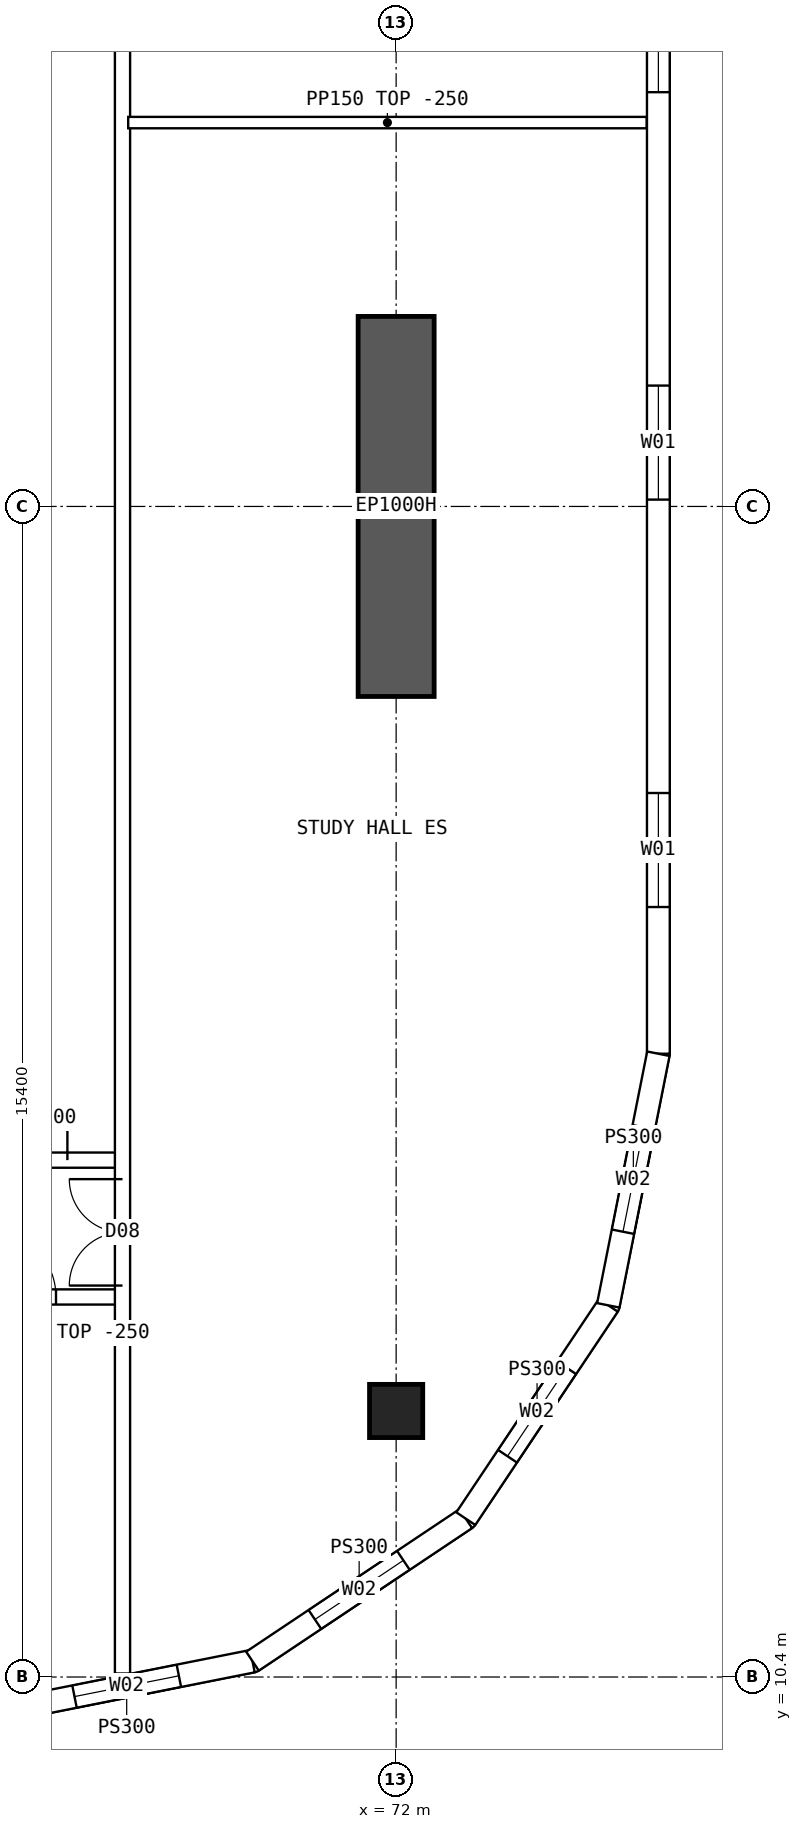
"""IFC4 building model, lengths in metres.
Left out: names, types, materials, properties, quantities, classifications, styles, units other than length and angle.
Written with IfcOpenShell. Run it as: python <this file> out.ifc"""

import sys

from ifc_helpers import new_model, si_unit, direction, frame, frame_2d, origin, origin_2d, place, context, subcontext, project, spatial, polyline, rectangle, hollow_rectangle, outline, extrude, element, fill, save


model = new_model("IFC4")
c1 = context("Model", 3, precision=1e-05, world=origin(), true_north=direction((0.0, 1.0)))
c2 = subcontext(c1, "Body", "Model", "MODEL_VIEW")
j1 = project(units=[si_unit("LENGTHUNIT", "METRE"), si_unit("PLANEANGLEUNIT", "RADIAN")], contexts=[c1])
p1 = place(None, origin())
s1 = spatial("IfcSite", under=j1, at=p1, CompositionType="ELEMENT")
p2 = place(p1, origin())
s2 = spatial("IfcBuilding", under=s1, at=p2, CompositionType="ELEMENT")
p3 = place(p2, frame((0.0, 0.0, 178.6)))
s3 = spatial("IfcBuildingStorey", under=s2, at=p3, CompositionType="ELEMENT", Elevation=178.6)
p4 = place(p3, frame((72.0, 13.9, 0.0), z_axis=(0.0, 0.0, 1.0), x_axis=(1.0, 0.0, 0.0)))
e1 = element("IfcColumn", 1, at=p4, inside=s3, PredefinedType="COLUMN", context=c2, shape_type="SweptSolid", body=[
    extrude(hollow_rectangle(XDim=0.7, YDim=0.7, WallThickness=0.07, at=origin_2d()), origin(), (0.0, 0.0, 1.0), 3.75),
])
p5 = place(p3, frame((72.0, 23.3, 0.0), z_axis=(0.0, 0.0, 1.0), x_axis=(0.0, 1.0, 0.0)))
e2 = element("IfcWall", 2, at=p5, inside=s3, PredefinedType="SHEAR", context=c2, shape_type="SweptSolid", body=[
    extrude(rectangle(XDim=5.0, YDim=1.0, at=frame_2d((2.5, 0.0))), origin(), (0.0, 0.0, 1.0), 3.75),
])
p6 = place(p3, frame((75.45, 18.6, 0.0), z_axis=(0.0, 0.0, 1.0), x_axis=(0.0, 1.0, 0.0)))
e3 = element("IfcWall", 3, at=p6, inside=s3, PredefinedType="SOLIDWALL", context=c2, shape_type="SweptSolid", body=[
    extrude(outline(polyline([(-0.015, -0.15), (26.815, -0.15), (26.785, 0.15), (0.015, 0.15), (-0.015, -0.15)])), origin(), (0.0, 0.0, 1.0), 3.5),
])
p7 = place(p6, frame((1.93, 0.0, 0.9)))
e4 = element("IfcOpeningElement", 4, at=p7, cuts=e3, PredefinedType="OPENING", context=c2, shape_type="SweptSolid", body=[
    extrude(rectangle(XDim=1.5, YDim=2.0, at=frame_2d((0.75, 1.0))), frame((0.0, 0.16, 0.0), z_axis=(0.0, -1.0, 0.0), x_axis=(1.0, 0.0, 0.0)), (0.0, 0.0, 1.0), 0.32),
])
p8 = place(p6, frame((7.29, 0.0, 0.9)))
e5 = element("IfcOpeningElement", 5, at=p8, cuts=e3, PredefinedType="OPENING", context=c2, shape_type="SweptSolid", body=[
    extrude(rectangle(XDim=1.5, YDim=2.0, at=frame_2d((0.75, 1.0))), frame((0.0, 0.16, 0.0), z_axis=(0.0, -1.0, 0.0), x_axis=(1.0, 0.0, 0.0)), (0.0, 0.0, 1.0), 0.32),
])
p9 = place(p6, frame((12.65, 0.0, 0.9)))
e6 = element("IfcOpeningElement", 6, at=p9, cuts=e3, PredefinedType="OPENING", context=c2, shape_type="SweptSolid", body=[
    extrude(rectangle(XDim=1.5, YDim=2.0, at=frame_2d((0.75, 1.0))), frame((0.0, 0.16, 0.0), z_axis=(0.0, -1.0, 0.0), x_axis=(1.0, 0.0, 0.0)), (0.0, 0.0, 1.0), 0.32),
])
p10 = place(p6, frame((18.01, 0.0, 0.9)))
e7 = element("IfcOpeningElement", 7, at=p10, cuts=e3, PredefinedType="OPENING", context=c2, shape_type="SweptSolid", body=[
    extrude(rectangle(XDim=1.5, YDim=2.0, at=frame_2d((0.75, 1.0))), frame((0.0, 0.16, 0.0), z_axis=(0.0, -1.0, 0.0), x_axis=(1.0, 0.0, 0.0)), (0.0, 0.0, 1.0), 0.32),
])
p11 = place(p6, frame((23.37, 0.0, 0.9)))
e8 = element("IfcOpeningElement", 8, at=p11, cuts=e3, PredefinedType="OPENING", context=c2, shape_type="SweptSolid", body=[
    extrude(rectangle(XDim=1.5, YDim=2.0, at=frame_2d((0.75, 1.0))), frame((0.0, 0.16, 0.0), z_axis=(0.0, -1.0, 0.0), x_axis=(1.0, 0.0, 0.0)), (0.0, 0.0, 1.0), 0.32),
])
p12 = place(p3, frame((66.8, 9.95, 0.0), z_axis=(0.0, 0.0, 1.0), x_axis=(0.98078325777, 0.195100490205, 0.0)))
e9 = element("IfcWall", 9, at=p12, inside=s3, PredefinedType="SOLIDWALL", context=c2, shape_type="SweptSolid", body=[
    extrude(outline(polyline([(-0.03, -0.15), (3.405, -0.15), (3.345, 0.15), (0.03, 0.15), (-0.03, -0.15)])), origin(), (0.0, 0.0, 1.0), 3.5),
])
p13 = place(p12, frame((0.988, 0.0, 0.9)))
e10 = element("IfcOpeningElement", 10, at=p13, cuts=e9, PredefinedType="OPENING", context=c2, shape_type="SweptSolid", body=[
    extrude(rectangle(XDim=1.4, YDim=1.8, at=frame_2d((0.7, 0.9))), frame((0.0, 0.16, 0.0), z_axis=(0.0, -1.0, 0.0), x_axis=(1.0, 0.0, 0.0)), (0.0, 0.0, 1.0), 0.32),
])
p14 = place(p3, frame((70.11, 10.608, 0.0), z_axis=(0.0, 0.0, 1.0), x_axis=(0.831493450887, 0.555534554399, 0.0)))
e11 = element("IfcWall", 11, at=p14, inside=s3, PredefinedType="SOLIDWALL", context=c2, shape_type="SweptSolid", body=[
    extrude(outline(polyline([(-0.03, -0.15), (3.405, -0.15), (3.345, 0.15), (0.03, 0.15), (-0.03, -0.15)])), origin(), (0.0, 0.0, 1.0), 3.5),
])
p15 = place(p14, frame((0.988, 0.0, 0.9)))
e12 = element("IfcOpeningElement", 12, at=p15, cuts=e11, PredefinedType="OPENING", context=c2, shape_type="SweptSolid", body=[
    extrude(rectangle(XDim=1.4, YDim=1.8, at=frame_2d((0.7, 0.9))), frame((0.0, 0.16, 0.0), z_axis=(0.0, -1.0, 0.0), x_axis=(1.0, 0.0, 0.0)), (0.0, 0.0, 1.0), 0.32),
])
p16 = place(p3, frame((72.917, 12.483, 0.0), z_axis=(0.0, 0.0, 1.0), x_axis=(0.555534554399, 0.831493450887, 0.0)))
e13 = element("IfcWall", 13, at=p16, inside=s3, PredefinedType="SOLIDWALL", context=c2, shape_type="SweptSolid", body=[
    extrude(outline(polyline([(-0.03, -0.15), (3.405, -0.15), (3.345, 0.15), (0.03, 0.15), (-0.03, -0.15)])), origin(), (0.0, 0.0, 1.0), 3.5),
])
p17 = place(p16, frame((0.988, 0.0, 0.9)))
e14 = element("IfcOpeningElement", 14, at=p17, cuts=e13, PredefinedType="OPENING", context=c2, shape_type="SweptSolid", body=[
    extrude(rectangle(XDim=1.4, YDim=1.8, at=frame_2d((0.7, 0.9))), frame((0.0, 0.16, 0.0), z_axis=(0.0, -1.0, 0.0), x_axis=(1.0, 0.0, 0.0)), (0.0, 0.0, 1.0), 0.32),
])
p18 = place(p3, frame((74.792, 15.29, 0.0), z_axis=(0.0, 0.0, 1.0), x_axis=(0.19508664885, 0.980786011034, 0.0)))
e15 = element("IfcWall", 15, at=p18, inside=s3, PredefinedType="SOLIDWALL", context=c2, shape_type="SweptSolid", body=[
    extrude(outline(polyline([(-0.03, -0.15), (3.39, -0.15), (3.36, 0.15), (0.03, 0.15), (-0.03, -0.15)])), origin(), (0.0, 0.0, 1.0), 3.5),
])
p19 = place(p18, frame((0.988, 0.0, 0.9)))
e16 = element("IfcOpeningElement", 16, at=p19, cuts=e15, PredefinedType="OPENING", context=c2, shape_type="SweptSolid", body=[
    extrude(rectangle(XDim=1.4, YDim=1.8, at=frame_2d((0.7, 0.9))), frame((0.0, 0.16, 0.0), z_axis=(0.0, -1.0, 0.0), x_axis=(1.0, 0.0, 0.0)), (0.0, 0.0, 1.0), 0.32),
])
p20 = place(p3, frame((66.425, 15.4, 0.0), z_axis=(0.0, 0.0, 1.0), x_axis=(1.0, 0.0, 0.0)))
e17 = element("IfcWall", 17, at=p20, inside=s3, PredefinedType="SOLIDWALL", context=c2, shape_type="SweptSolid", body=[
    extrude(rectangle(XDim=1.975, YDim=0.2, at=frame_2d((0.987, 0.0))), origin(), (0.0, 0.0, 1.0), 3.5),
])
p21 = place(p20, frame((0.2, 0.0, 0.0)))
e18 = element("IfcOpeningElement", 18, at=p21, cuts=e17, PredefinedType="OPENING", context=c2, shape_type="SweptSolid", body=[
    extrude(rectangle(XDim=0.9, YDim=2.1, at=frame_2d((0.45, 1.05))), frame((0.0, 0.11, 0.0), z_axis=(0.0, -1.0, 0.0), x_axis=(1.0, 0.0, 0.0)), (0.0, 0.0, 1.0), 0.22),
])
p22 = place(p3, frame((66.425, 17.2, 0.0), z_axis=(0.0, 0.0, 1.0), x_axis=(1.0, 0.0, 0.0)))
e19 = element("IfcWall", 19, at=p22, inside=s3, PredefinedType="SOLIDWALL", context=c2, shape_type="SweptSolid", body=[
    extrude(rectangle(XDim=1.975, YDim=0.2, at=frame_2d((0.987, 0.0))), origin(), (0.0, 0.0, 1.0), 3.5),
])
p23 = place(p22, frame((0.05, 0.0, 0.0)))
e20 = element("IfcOpeningElement", 20, at=p23, cuts=e19, PredefinedType="OPENING", context=c2, shape_type="SweptSolid", body=[
    extrude(rectangle(XDim=1.2, YDim=2.1, at=frame_2d((0.6, 1.05))), frame((0.0, 0.11, 0.0), z_axis=(0.0, -1.0, 0.0), x_axis=(1.0, 0.0, 0.0)), (0.0, 0.0, 1.0), 0.22),
])
p24 = place(p3, frame((68.475, 30.85, 0.0), z_axis=(0.0, 0.0, 1.0), x_axis=(1.0, 0.0, 0.0)))
e21 = element("IfcWall", 21, at=p24, inside=s3, PredefinedType="PARTITIONING", context=c2, shape_type="SweptSolid", body=[
    extrude(outline(polyline([(0.0, 0.0), (6.82, 0.0), (6.82, 3.5), (3.827, 3.5), (3.825, 3.05), (3.227, 3.05), (3.225, 3.5), (0.0, 3.5), (0.0, 0.0)])), frame((0.0, 0.075, 0.0), z_axis=(0.0, -1.0, 0.0), x_axis=(1.0, 0.0, 0.0)), (0.0, 0.0, 1.0), 0.15),
])
p25 = place(p3, frame((68.4, 10.446, 0.0), z_axis=(0.0, 0.0, 1.0), x_axis=(0.0, 1.0, 0.0)))
e22 = element("IfcWall", 22, at=p25, inside=s3, PredefinedType="SOLIDWALL", context=c2, shape_type="SweptSolid", body=[
    extrude(rectangle(XDim=43.107, YDim=0.2, at=frame_2d((21.554, 0.0))), origin(), (0.0, 0.0, 1.0), 3.5),
])
p26 = place(p25, frame((5.104, 0.0, 0.0)))
e23 = element("IfcOpeningElement", 23, at=p26, cuts=e22, PredefinedType="OPENING", context=c2, shape_type="SweptSolid", body=[
    extrude(rectangle(XDim=1.4, YDim=2.1, at=frame_2d((0.7, 1.05))), frame((0.0, 0.11, 0.0), z_axis=(0.0, -1.0, 0.0), x_axis=(1.0, 0.0, 0.0)), (0.0, 0.0, 1.0), 0.22),
])
p27 = place(p25, frame((36.504, 0.0, 0.0)))
e24 = element("IfcOpeningElement", 24, at=p27, cuts=e22, PredefinedType="OPENING", context=c2, shape_type="SweptSolid", body=[
    extrude(rectangle(XDim=1.4, YDim=2.1, at=frame_2d((0.7, 1.05))), frame((0.0, 0.11, 0.0), z_axis=(0.0, -1.0, 0.0), x_axis=(1.0, 0.0, 0.0)), (0.0, 0.0, 1.0), 0.22),
])
p28 = place(p7, origin())
e25 = element("IfcWindow", 25, at=p28, inside=s3, PartitioningType="SINGLE_PANEL", PredefinedType="WINDOW", context=c2, shape_type="SweptSolid", body=[
    extrude(rectangle(XDim=1.5, YDim=2.0, at=frame_2d((0.75, 1.0))), frame((0.0, 0.03, 0.0), z_axis=(0.0, -1.0, 0.0), x_axis=(1.0, 0.0, 0.0)), (0.0, 0.0, 1.0), 0.06),
])
fill(e4, e25)
p29 = place(p8, origin())
e26 = element("IfcWindow", 26, at=p29, inside=s3, PartitioningType="SINGLE_PANEL", PredefinedType="WINDOW", context=c2, shape_type="SweptSolid", body=[
    extrude(rectangle(XDim=1.5, YDim=2.0, at=frame_2d((0.75, 1.0))), frame((0.0, 0.03, 0.0), z_axis=(0.0, -1.0, 0.0), x_axis=(1.0, 0.0, 0.0)), (0.0, 0.0, 1.0), 0.06),
])
fill(e5, e26)
p30 = place(p9, origin())
e27 = element("IfcWindow", 27, at=p30, inside=s3, PartitioningType="SINGLE_PANEL", PredefinedType="WINDOW", context=c2, shape_type="SweptSolid", body=[
    extrude(rectangle(XDim=1.5, YDim=2.0, at=frame_2d((0.75, 1.0))), frame((0.0, 0.03, 0.0), z_axis=(0.0, -1.0, 0.0), x_axis=(1.0, 0.0, 0.0)), (0.0, 0.0, 1.0), 0.06),
])
fill(e6, e27)
p31 = place(p13, origin())
e28 = element("IfcWindow", 28, at=p31, inside=s3, PartitioningType="SINGLE_PANEL", PredefinedType="WINDOW", context=c2, shape_type="SweptSolid", body=[
    extrude(rectangle(XDim=1.4, YDim=1.8, at=frame_2d((0.7, 0.9))), frame((0.0, 0.03, 0.0), z_axis=(0.0, -1.0, 0.0), x_axis=(1.0, 0.0, 0.0)), (0.0, 0.0, 1.0), 0.06),
])
fill(e10, e28)
p32 = place(p15, origin())
e29 = element("IfcWindow", 29, at=p32, inside=s3, PartitioningType="SINGLE_PANEL", PredefinedType="WINDOW", context=c2, shape_type="SweptSolid", body=[
    extrude(rectangle(XDim=1.4, YDim=1.8, at=frame_2d((0.7, 0.9))), frame((0.0, 0.03, 0.0), z_axis=(0.0, -1.0, 0.0), x_axis=(1.0, 0.0, 0.0)), (0.0, 0.0, 1.0), 0.06),
])
fill(e12, e29)
p33 = place(p17, origin())
e30 = element("IfcWindow", 30, at=p33, inside=s3, PartitioningType="SINGLE_PANEL", PredefinedType="WINDOW", context=c2, shape_type="SweptSolid", body=[
    extrude(rectangle(XDim=1.4, YDim=1.8, at=frame_2d((0.7, 0.9))), frame((0.0, 0.03, 0.0), z_axis=(0.0, -1.0, 0.0), x_axis=(1.0, 0.0, 0.0)), (0.0, 0.0, 1.0), 0.06),
])
fill(e14, e30)
p34 = place(p19, origin())
e31 = element("IfcWindow", 31, at=p34, inside=s3, PartitioningType="SINGLE_PANEL", PredefinedType="WINDOW", context=c2, shape_type="SweptSolid", body=[
    extrude(rectangle(XDim=1.4, YDim=1.8, at=frame_2d((0.7, 0.9))), frame((0.0, 0.03, 0.0), z_axis=(0.0, -1.0, 0.0), x_axis=(1.0, 0.0, 0.0)), (0.0, 0.0, 1.0), 0.06),
])
fill(e16, e31)
p35 = place(p23, origin())
e32 = element("IfcDoor", 32, at=p35, inside=s3, OperationType="DOUBLE_DOOR_SINGLE_SWING", PredefinedType="DOOR", context=c2, shape_type="SweptSolid", body=[
    extrude(rectangle(XDim=1.2, YDim=2.1, at=frame_2d((0.6, 1.05))), frame((0.0, 0.025, 0.0), z_axis=(0.0, -1.0, 0.0), x_axis=(1.0, 0.0, 0.0)), (0.0, 0.0, 1.0), 0.05),
])
fill(e20, e32)
p36 = place(p26, origin())
e33 = element("IfcDoor", 33, at=p36, inside=s3, OperationType="DOUBLE_DOOR_SINGLE_SWING", PredefinedType="DOOR", context=c2, shape_type="SweptSolid", body=[
    extrude(rectangle(XDim=1.4, YDim=2.1, at=frame_2d((0.7, 1.05))), frame((0.0, 0.025, 0.0), z_axis=(0.0, -1.0, 0.0), x_axis=(1.0, 0.0, 0.0)), (0.0, 0.0, 1.0), 0.05),
])
fill(e23, e33)
p37 = place(p21, origin())
e34 = element("IfcDoor", 34, at=p37, inside=s3, OperationType="SINGLE_SWING_LEFT", PredefinedType="DOOR", context=c2, shape_type="SweptSolid", body=[
    extrude(rectangle(XDim=0.9, YDim=2.1, at=frame_2d((0.45, 1.05))), frame((0.0, 0.025, 0.0), z_axis=(0.0, -1.0, 0.0), x_axis=(1.0, 0.0, 0.0)), (0.0, 0.0, 1.0), 0.05),
])
fill(e18, e34)
save(model, sys.argv[1])
